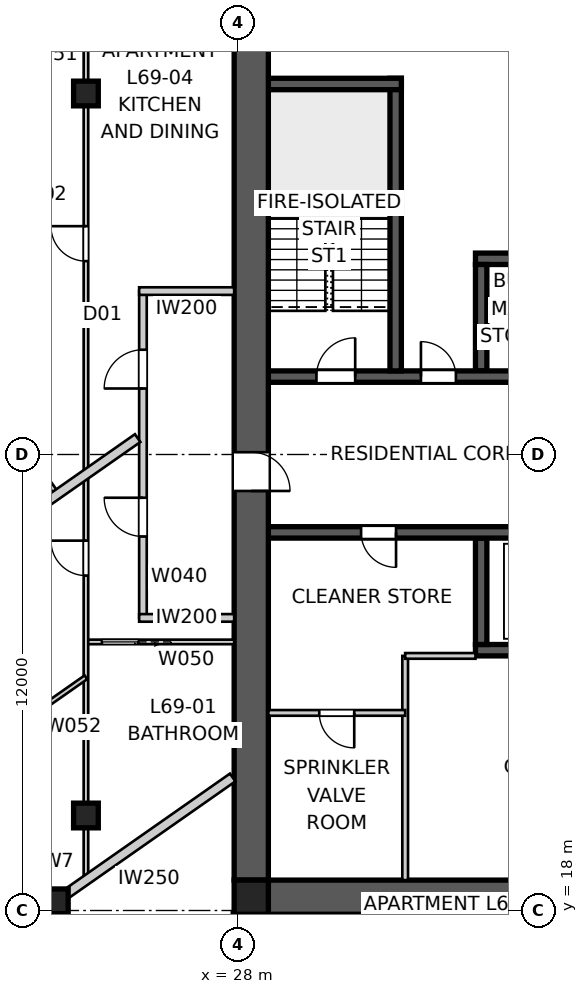
"""IFC4 building model, lengths in metres.
Left out: names, types, materials, properties, quantities, classifications, styles, units other than length and angle.
Written with IfcOpenShell. Run it as: python <this file> out.ifc"""

import sys

from ifc_helpers import new_model, si_unit, direction, frame, frame_2d, origin, origin_2d, place, context, subcontext, project, spatial, polyline, rectangle, outline, extrude, element, fill, save


model = new_model("IFC4")
c1 = context("Model", 3, precision=1e-05, world=origin(), true_north=direction((0.0, 1.0)))
c2 = subcontext(c1, "Body", "Model", "MODEL_VIEW")
j1 = project(units=[si_unit("LENGTHUNIT", "METRE"), si_unit("PLANEANGLEUNIT", "RADIAN")], contexts=[c1])
p1 = place(None, origin())
s1 = spatial("IfcSite", under=j1, at=p1, CompositionType="ELEMENT")
p2 = place(p1, origin())
s2 = spatial("IfcBuilding", under=s1, at=p2, CompositionType="ELEMENT")
p3 = place(p2, frame((0.0, 0.0, 250.6)))
s3 = spatial("IfcBuildingStorey", under=s2, at=p3, CompositionType="ELEMENT", Elevation=250.6)
p4 = place(p3, frame((51.2, 18.35, 0.0), z_axis=(0.0, 0.0, 1.0), x_axis=(-1.0, 0.0, 0.0)))
e1 = element("IfcWall", 1, at=p4, inside=s3, PredefinedType="SHEAR", context=c2, shape_type="SweptSolid", body=[
    extrude(outline(polyline([(0.0, -0.45), (22.4, -0.45), (22.4, -0.025), (22.85, -0.025), (22.85, 0.025), (22.4, 0.025), (22.4, 0.45), (0.0, 0.45), (0.0, 0.025), (-0.45, 0.025), (-0.45, -0.025), (0.0, -0.025), (0.0, -0.45)])), origin(), (0.0, 0.0, 1.0), 3.4),
])
p5 = place(p3, frame((28.35, 41.2, 0.0), z_axis=(0.0, 0.0, 1.0), x_axis=(0.0, -1.0, 0.0)))
e2 = element("IfcWall", 2, at=p5, inside=s3, PredefinedType="SHEAR", context=c2, shape_type="SweptSolid", body=[
    extrude(outline(polyline([(0.0, -0.45), (22.4, -0.45), (22.4, -0.025), (22.85, -0.025), (22.85, 0.025), (22.4, 0.025), (22.4, 0.45), (0.0, 0.45), (0.0, 0.025), (-0.45, 0.025), (-0.45, -0.025), (0.0, -0.025), (0.0, -0.45)])), origin(), (0.0, 0.0, 1.0), 3.4),
])
p6 = place(p5, frame((11.14, 0.0, 0.0)))
e3 = element("IfcOpeningElement", 3, at=p6, cuts=e2, PredefinedType="OPENING", context=c2, shape_type="SweptSolid", body=[
    extrude(rectangle(XDim=1.02, YDim=2.4, at=frame_2d((0.51, 1.2))), frame((0.0, 0.46, 0.0), z_axis=(0.0, -1.0, 0.0), x_axis=(1.0, 0.0, 0.0)), (0.0, 0.0, 1.0), 0.92),
])
p7 = place(p3, frame((28.8, 32.05, 0.0), z_axis=(0.0, 0.0, 1.0), x_axis=(1.0, 0.0, 0.0)))
e4 = element("IfcWall", 4, at=p7, inside=s3, PredefinedType="SHEAR", context=c2, shape_type="SweptSolid", body=[
    extrude(rectangle(XDim=22.4, YDim=0.3, at=frame_2d((11.2, 0.0))), origin(), (0.0, 0.0, 1.0), 3.4),
])
p8 = place(p7, frame((19.04, 0.0, 0.0)))
e5 = element("IfcOpeningElement", 5, at=p8, cuts=e4, PredefinedType="OPENING", context=c2, shape_type="SweptSolid", body=[
    extrude(rectangle(XDim=0.92, YDim=2.1, at=frame_2d((0.46, 1.05))), frame((0.0, 0.16, 0.0), z_axis=(0.0, -1.0, 0.0), x_axis=(1.0, 0.0, 0.0)), (0.0, 0.0, 1.0), 0.32),
])
p9 = place(p7, frame((1.265, 0.0, 0.0)))
e6 = element("IfcOpeningElement", 6, at=p9, cuts=e4, PredefinedType="OPENING", context=c2, shape_type="SweptSolid", body=[
    extrude(rectangle(XDim=1.02, YDim=2.1, at=frame_2d((0.51, 1.05))), frame((0.0, 0.16, 0.0), z_axis=(0.0, -1.0, 0.0), x_axis=(1.0, 0.0, 0.0)), (0.0, 0.0, 1.0), 0.32),
])
p10 = place(p7, frame((4.015, 0.0, 0.0)))
e7 = element("IfcOpeningElement", 7, at=p10, cuts=e4, PredefinedType="OPENING", context=c2, shape_type="SweptSolid", body=[
    extrude(rectangle(XDim=0.92, YDim=2.1, at=frame_2d((0.46, 1.05))), frame((0.0, 0.16, 0.0), z_axis=(0.0, -1.0, 0.0), x_axis=(1.0, 0.0, 0.0)), (0.0, 0.0, 1.0), 0.32),
])
p11 = place(p7, frame((6.565, 0.0, 0.0)))
e8 = element("IfcOpeningElement", 8, at=p11, cuts=e4, PredefinedType="OPENING", context=c2, shape_type="SweptSolid", body=[
    extrude(rectangle(XDim=0.92, YDim=2.1, at=frame_2d((0.46, 1.05))), frame((0.0, 0.16, 0.0), z_axis=(0.0, -1.0, 0.0), x_axis=(1.0, 0.0, 0.0)), (0.0, 0.0, 1.0), 0.32),
])
p12 = place(p7, frame((8.89, 0.0, 0.0)))
e9 = element("IfcOpeningElement", 9, at=p12, cuts=e4, PredefinedType="OPENING", context=c2, shape_type="SweptSolid", body=[
    extrude(rectangle(XDim=0.92, YDim=2.1, at=frame_2d((0.46, 1.05))), frame((0.0, 0.16, 0.0), z_axis=(0.0, -1.0, 0.0), x_axis=(1.0, 0.0, 0.0)), (0.0, 0.0, 1.0), 0.32),
])
p13 = place(p7, frame((12.05, 0.0, 0.0)))
e10 = element("IfcOpeningElement", 10, at=p13, cuts=e4, PredefinedType="OPENING", context=c2, shape_type="SweptSolid", body=[
    extrude(rectangle(XDim=1.1, YDim=2.1, at=frame_2d((0.55, 1.05))), frame((0.0, 0.16, 0.0), z_axis=(0.0, -1.0, 0.0), x_axis=(1.0, 0.0, 0.0)), (0.0, 0.0, 1.0), 0.32),
])
p14 = place(p7, frame((14.85, 0.0, 0.0)))
e11 = element("IfcOpeningElement", 11, at=p14, cuts=e4, PredefinedType="OPENING", context=c2, shape_type="SweptSolid", body=[
    extrude(rectangle(XDim=1.1, YDim=2.1, at=frame_2d((0.55, 1.05))), frame((0.0, 0.16, 0.0), z_axis=(0.0, -1.0, 0.0), x_axis=(1.0, 0.0, 0.0)), (0.0, 0.0, 1.0), 0.32),
])
p15 = place(p3, frame((51.2, 27.95, 0.0), z_axis=(0.0, 0.0, 1.0), x_axis=(-1.0, 0.0, 0.0)))
e12 = element("IfcWall", 12, at=p15, inside=s3, PredefinedType="SHEAR", context=c2, shape_type="SweptSolid", body=[
    extrude(rectangle(XDim=22.4, YDim=0.3, at=frame_2d((11.2, 0.0))), origin(), (0.0, 0.0, 1.0), 3.4),
])
p16 = place(p15, frame((19.04, 0.0, 0.0)))
e13 = element("IfcOpeningElement", 13, at=p16, cuts=e12, PredefinedType="OPENING", context=c2, shape_type="SweptSolid", body=[
    extrude(rectangle(XDim=0.92, YDim=2.1, at=frame_2d((0.46, 1.05))), frame((0.0, 0.16, 0.0), z_axis=(0.0, -1.0, 0.0), x_axis=(1.0, 0.0, 0.0)), (0.0, 0.0, 1.0), 0.32),
])
p17 = place(p15, frame((1.265, 0.0, 0.0)))
e14 = element("IfcOpeningElement", 14, at=p17, cuts=e12, PredefinedType="OPENING", context=c2, shape_type="SweptSolid", body=[
    extrude(rectangle(XDim=1.02, YDim=2.1, at=frame_2d((0.51, 1.05))), frame((0.0, 0.16, 0.0), z_axis=(0.0, -1.0, 0.0), x_axis=(1.0, 0.0, 0.0)), (0.0, 0.0, 1.0), 0.32),
])
p18 = place(p15, frame((4.015, 0.0, 0.0)))
e15 = element("IfcOpeningElement", 15, at=p18, cuts=e12, PredefinedType="OPENING", context=c2, shape_type="SweptSolid", body=[
    extrude(rectangle(XDim=0.92, YDim=2.1, at=frame_2d((0.46, 1.05))), frame((0.0, 0.16, 0.0), z_axis=(0.0, -1.0, 0.0), x_axis=(1.0, 0.0, 0.0)), (0.0, 0.0, 1.0), 0.32),
])
p19 = place(p15, frame((8.89, 0.0, 0.0)))
e16 = element("IfcOpeningElement", 16, at=p19, cuts=e12, PredefinedType="OPENING", context=c2, shape_type="SweptSolid", body=[
    extrude(rectangle(XDim=0.92, YDim=2.1, at=frame_2d((0.46, 1.05))), frame((0.0, 0.16, 0.0), z_axis=(0.0, -1.0, 0.0), x_axis=(1.0, 0.0, 0.0)), (0.0, 0.0, 1.0), 0.32),
])
p20 = place(p15, frame((6.565, 0.0, 0.0)))
e17 = element("IfcOpeningElement", 17, at=p20, cuts=e12, PredefinedType="OPENING", context=c2, shape_type="SweptSolid", body=[
    extrude(rectangle(XDim=0.92, YDim=2.1, at=frame_2d((0.46, 1.05))), frame((0.0, 0.16, 0.0), z_axis=(0.0, -1.0, 0.0), x_axis=(1.0, 0.0, 0.0)), (0.0, 0.0, 1.0), 0.32),
])
p21 = place(p15, frame((12.05, 0.0, 0.0)))
e18 = element("IfcOpeningElement", 18, at=p21, cuts=e12, PredefinedType="OPENING", context=c2, shape_type="SweptSolid", body=[
    extrude(rectangle(XDim=1.1, YDim=2.1, at=frame_2d((0.55, 1.05))), frame((0.0, 0.16, 0.0), z_axis=(0.0, -1.0, 0.0), x_axis=(1.0, 0.0, 0.0)), (0.0, 0.0, 1.0), 0.32),
])
p22 = place(p15, frame((14.85, 0.0, 0.0)))
e19 = element("IfcOpeningElement", 19, at=p22, cuts=e12, PredefinedType="OPENING", context=c2, shape_type="SweptSolid", body=[
    extrude(rectangle(XDim=1.1, YDim=2.1, at=frame_2d((0.55, 1.05))), frame((0.0, 0.16, 0.0), z_axis=(0.0, -1.0, 0.0), x_axis=(1.0, 0.0, 0.0)), (0.0, 0.0, 1.0), 0.32),
])
for number, where, z_axis, x_axis in (
    (20, (34.25, 35.15, 0.0), (0.0, 0.0, 1.0), (1.0, 0.0, 0.0)),
    (21, (45.75, 24.85, 0.0), (0.0, 0.0, 1.0), (-1.0, 0.0, 0.0)),
):
    element("IfcWall", number, at=place(p3, frame(where, z_axis=z_axis, x_axis=x_axis)), inside=s3, PredefinedType="SHEAR", context=c2, shape_type="SweptSolid", body=[
        extrude(rectangle(XDim=11.5, YDim=0.3, at=frame_2d((5.75, 0.0))), origin(), (0.0, 0.0, 1.0), 3.4),
    ])
for number, where, z_axis, x_axis in (
    (22, (34.4, 32.2, 0.0), (0.0, 0.0, 1.0), (0.0, 1.0, 0.0)),
    (23, (34.4, 27.8, 0.0), (0.0, 0.0, 1.0), (0.0, -1.0, 0.0)),
):
    element("IfcWall", number, at=place(p3, frame(where, z_axis=z_axis, x_axis=x_axis)), inside=s3, PredefinedType="SHEAR", context=c2, shape_type="SweptSolid", body=[
        extrude(rectangle(XDim=2.8, YDim=0.3, at=frame_2d((1.4, 0.0))), origin(), (0.0, 0.0, 1.0), 3.4),
    ])
p23 = place(p3, frame((32.15, 32.2, 0.0), z_axis=(0.0, 0.0, 1.0), x_axis=(0.0, 1.0, 0.0)))
e24 = element("IfcWall", 24, at=p23, inside=s3, PredefinedType="SHEAR", context=c2, shape_type="SweptSolid", body=[
    extrude(rectangle(XDim=7.7, YDim=0.3, at=frame_2d((3.85, 0.0))), origin(), (0.0, 0.0, 1.0), 3.4),
])
p24 = place(p3, frame((28.8, 39.75, 0.0), z_axis=(0.0, 0.0, 1.0), x_axis=(1.0, 0.0, 0.0)))
e25 = element("IfcWall", 25, at=p24, inside=s3, PredefinedType="SHEAR", context=c2, shape_type="SweptSolid", body=[
    extrude(rectangle(XDim=3.5, YDim=0.3, at=frame_2d((1.75, 0.0))), origin(), (0.0, 0.0, 1.0), 3.4),
])
p25 = place(p3, frame((28.35, 18.35, 0.0), z_axis=(0.0, 0.0, 1.0), x_axis=(1.0, 0.0, 0.0)))
e26 = element("IfcColumn", 26, at=p25, inside=s3, PredefinedType="COLUMN", context=c2, shape_type="SweptSolid", body=[
    extrude(rectangle(XDim=0.9, YDim=0.9, at=origin_2d()), origin(), (0.0, 0.0, 1.0), 3.4),
])
for number, where, z_axis, x_axis in (
    (27, (23.207, 18.242, 0.0), (0.0, 0.0, 1.0), (1.0, 0.0, 0.0)),
    (28, (24.0, 39.5, 0.0), (0.0, 0.0, 1.0), (1.0, 0.0, 0.0)),
    (29, (24.0, 20.5, 0.0), (0.0, 0.0, 1.0), (1.0, 0.0, 0.0)),
):
    element("IfcColumn", number, at=place(p3, frame(where, z_axis=z_axis, x_axis=x_axis)), inside=s3, PredefinedType="COLUMN", context=c2, shape_type="SweptSolid", body=[
        extrude(rectangle(XDim=0.65, YDim=0.65, at=origin_2d()), origin(), (0.0, 0.0, 1.0), 3.4),
    ])
p26 = place(p3, frame((25.5, 25.7, 0.0), z_axis=(0.0, 0.0, 1.0), x_axis=(0.0, 1.0, 0.0)))
e30 = element("IfcWall", 30, at=p26, inside=s3, PredefinedType="PARTITIONING", context=c2, shape_type="SweptSolid", body=[
    extrude(rectangle(XDim=8.6, YDim=0.2, at=frame_2d((4.3, 0.0))), origin(), (0.0, 0.0, 1.0), 3.25),
])
p27 = place(p26, frame((2.142, 0.0, 0.0)))
e31 = element("IfcOpeningElement", 31, at=p27, cuts=e30, PredefinedType="OPENING", context=c2, shape_type="SweptSolid", body=[
    extrude(rectangle(XDim=1.02, YDim=2.34, at=frame_2d((0.51, 1.17))), frame((0.0, 0.11, 0.0), z_axis=(0.0, -1.0, 0.0), x_axis=(1.0, 0.0, 0.0)), (0.0, 0.0, 1.0), 0.22),
])
p28 = place(p26, frame((6.037, 0.0, 0.0)))
e32 = element("IfcOpeningElement", 32, at=p28, cuts=e30, PredefinedType="OPENING", context=c2, shape_type="SweptSolid", body=[
    extrude(rectangle(XDim=1.02, YDim=2.34, at=frame_2d((0.51, 1.17))), frame((0.0, 0.11, 0.0), z_axis=(0.0, -1.0, 0.0), x_axis=(1.0, 0.0, 0.0)), (0.0, 0.0, 1.0), 0.22),
])
for number, where, z_axis, x_axis in (
    (33, (27.9, 34.3, 0.0), (0.0, 0.0, 1.0), (-1.0, 0.0, 0.0)),
    (34, (27.9, 25.7, 0.0), (0.0, 0.0, 1.0), (-1.0, 0.0, 0.0)),
):
    element("IfcWall", number, at=place(p3, frame(where, z_axis=z_axis, x_axis=x_axis)), inside=s3, PredefinedType="PARTITIONING", context=c2, shape_type="SweptSolid", body=[
        extrude(rectangle(XDim=2.5, YDim=0.2, at=frame_2d((1.25, 0.0))), origin(), (0.0, 0.0, 1.0), 3.25),
    ])
p29 = place(p3, frame((22.388, 17.668, 0.0), z_axis=(0.0, 0.0, 1.0), x_axis=(0.819161528122, 0.573562891796, 0.0)))
e35 = element("IfcWall", 35, at=p29, inside=s3, PredefinedType="PARTITIONING", context=c2, shape_type="SweptSolid", body=[
    extrude(rectangle(XDim=6.681, YDim=0.25, at=frame_2d((3.341, 0.0))), origin(), (0.0, 0.0, 1.0), 3.25),
])
p30 = place(p3, frame((17.369, 24.836, 0.0), z_axis=(0.0, 0.0, 1.0), x_axis=(0.81915902312, 0.573566469418, 0.0)))
e36 = element("IfcWall", 36, at=p30, inside=s3, PredefinedType="PARTITIONING", context=c2, shape_type="SweptSolid", body=[
    extrude(rectangle(XDim=9.756, YDim=0.25, at=frame_2d((4.878, 0.0))), origin(), (0.0, 0.0, 1.0), 3.25),
])
p31 = place(p3, frame((32.4, 18.8, 0.0), z_axis=(0.0, 0.0, 1.0), x_axis=(0.0, 1.0, 0.0)))
e37 = element("IfcWall", 37, at=p31, inside=s3, PredefinedType="SOLIDWALL", context=c2, shape_type="SweptSolid", body=[
    extrude(rectangle(XDim=5.9, YDim=0.15, at=frame_2d((2.95, 0.0))), origin(), (0.0, 0.0, 1.0), 3.25),
])
p32 = place(p3, frame((32.4, 24.7, 0.0), z_axis=(0.0, 0.0, 1.0), x_axis=(1.0, 0.0, 0.0)))
e38 = element("IfcWall", 38, at=p32, inside=s3, PredefinedType="SOLIDWALL", context=c2, shape_type="SweptSolid", body=[
    extrude(rectangle(XDim=1.85, YDim=0.15, at=frame_2d((0.925, 0.0))), origin(), (0.0, 0.0, 1.0), 3.25),
])
p33 = place(p3, frame((32.4, 23.2, 0.0), z_axis=(0.0, 0.0, 1.0), x_axis=(-1.0, 0.0, 0.0)))
e39 = element("IfcWall", 39, at=p33, inside=s3, PredefinedType="SOLIDWALL", context=c2, shape_type="SweptSolid", body=[
    extrude(rectangle(XDim=3.6, YDim=0.15, at=frame_2d((1.8, 0.0))), origin(), (0.0, 0.0, 1.0), 3.25),
])
p34 = place(p33, frame((1.34, 0.0, 0.0)))
e40 = element("IfcOpeningElement", 40, at=p34, cuts=e39, PredefinedType="OPENING", context=c2, shape_type="SweptSolid", body=[
    extrude(rectangle(XDim=0.92, YDim=2.1, at=frame_2d((0.46, 1.05))), frame((0.0, 0.085, 0.0), z_axis=(0.0, -1.0, 0.0), x_axis=(1.0, 0.0, 0.0)), (0.0, 0.0, 1.0), 0.17),
])
p35 = place(p3, frame((27.9, 25.068, 0.0), z_axis=(0.0, 0.0, 1.0), x_axis=(-1.0, 0.0, 0.0)))
e41 = element("IfcWall", 41, at=p35, inside=s3, PredefinedType="PARTITIONING", context=c2, shape_type="SweptSolid", body=[
    extrude(rectangle(XDim=3.9, YDim=0.12, at=frame_2d((1.95, 0.0))), origin(), (0.0, 0.0, 1.0), 3.25),
])
p36 = place(p35, frame((2.52, 0.0, 0.0)))
e42 = element("IfcOpeningElement", 42, at=p36, cuts=e41, PredefinedType="OPENING", context=c2, shape_type="SweptSolid", body=[
    extrude(rectangle(XDim=0.96, YDim=2.1, at=frame_2d((0.48, 1.05))), frame((0.0, 0.07, 0.0), z_axis=(0.0, -1.0, 0.0), x_axis=(1.0, 0.0, 0.0)), (0.0, 0.0, 1.0), 0.14),
])
p37 = place(p3, frame((24.0, 18.797, 0.0), z_axis=(0.0, 0.0, 1.0), x_axis=(0.0, 1.0, 0.0)))
e43 = element("IfcWall", 43, at=p37, inside=s3, PredefinedType="PARTITIONING", context=c2, shape_type="SweptSolid", body=[
    extrude(rectangle(XDim=26.198, YDim=0.12, at=frame_2d((13.099, 0.0))), origin(), (0.0, 0.0, 1.0), 2.55),
])
p38 = place(p37, frame((8.016, 0.0, 0.0)))
e44 = element("IfcOpeningElement", 44, at=p38, cuts=e43, PredefinedType="OPENING", context=c2, shape_type="SweptSolid", body=[
    extrude(rectangle(XDim=0.92, YDim=2.34, at=frame_2d((0.46, 1.17))), frame((0.0, 0.07, 0.0), z_axis=(0.0, -1.0, 0.0), x_axis=(1.0, 0.0, 0.0)), (0.0, 0.0, 1.0), 0.14),
])
p39 = place(p37, frame((16.292, 0.0, 0.0)))
e45 = element("IfcOpeningElement", 45, at=p39, cuts=e43, PredefinedType="OPENING", context=c2, shape_type="SweptSolid", body=[
    extrude(rectangle(XDim=0.92, YDim=2.34, at=frame_2d((0.46, 1.17))), frame((0.0, 0.07, 0.0), z_axis=(0.0, -1.0, 0.0), x_axis=(1.0, 0.0, 0.0)), (0.0, 0.0, 1.0), 0.14),
])
p40 = place(p3, frame((24.0, 24.138, 0.0), z_axis=(0.0, 0.0, 1.0), x_axis=(-0.819144584763, -0.57358708951, 0.0)))
e46 = element("IfcWall", 46, at=p40, inside=s3, PredefinedType="PARTITIONING", context=c2, shape_type="SweptSolid", body=[
    extrude(rectangle(XDim=4.991, YDim=0.12, at=frame_2d((2.496, 0.0))), origin(), (0.0, 0.0, 1.0), 3.25),
])
p41 = place(p40, frame((2.055, 0.0, 0.0)))
e47 = element("IfcOpeningElement", 47, at=p41, cuts=e46, PredefinedType="OPENING", context=c2, shape_type="SweptSolid", body=[
    extrude(rectangle(XDim=0.92, YDim=2.34, at=frame_2d((0.46, 1.17))), frame((0.0, 0.07, 0.0), z_axis=(0.0, -1.0, 0.0), x_axis=(1.0, 0.0, 0.0)), (0.0, 0.0, 1.0), 0.14),
])
p42 = place(p3, frame((27.9, 17.95, 0.0), z_axis=(0.0, 0.0, 1.0), x_axis=(0.0, -1.0, 0.0)))
e48 = element("IfcWall", 48, at=p42, inside=s3, PredefinedType="PARTITIONING", context=c2, shape_type="SweptSolid", body=[
    extrude(rectangle(XDim=0.909, YDim=0.12, at=frame_2d((0.454, 0.0))), origin(), (0.0, 0.0, 1.0), 3.25),
])
p43 = place(p3, frame((23.24, 28.947, 0.0), z_axis=(0.0, 0.0, 1.0), x_axis=(-0.573582185905, 0.819148018378, 0.0)))
e49 = element("IfcWall", 49, at=p43, inside=s3, PredefinedType="PARTITIONING", context=c2, shape_type="SweptSolid", body=[
    extrude(rectangle(XDim=8.75, YDim=0.12, at=frame_2d((4.375, 0.0))), origin(), (0.0, 0.0, 1.0), 3.25),
])
p44 = place(p43, frame((6.078, 0.0, 0.0)))
e50 = element("IfcOpeningElement", 50, at=p44, cuts=e49, PredefinedType="OPENING", context=c2, shape_type="SweptSolid", body=[
    extrude(rectangle(XDim=0.92, YDim=2.34, at=frame_2d((0.46, 1.17))), frame((0.0, 0.07, 0.0), z_axis=(0.0, -1.0, 0.0), x_axis=(1.0, 0.0, 0.0)), (0.0, 0.0, 1.0), 0.14),
])
p45 = place(p43, frame((1.752, 0.0, 0.0)))
e51 = element("IfcOpeningElement", 51, at=p45, cuts=e49, PredefinedType="OPENING", context=c2, shape_type="SweptSolid", body=[
    extrude(rectangle(XDim=0.92, YDim=2.34, at=frame_2d((0.46, 1.17))), frame((0.0, 0.07, 0.0), z_axis=(0.0, -1.0, 0.0), x_axis=(1.0, 0.0, 0.0)), (0.0, 0.0, 1.0), 0.14),
])
p46 = place(p16, origin())
e52 = element("IfcDoor", 52, at=p46, inside=s3, OperationType="SINGLE_SWING_LEFT", PredefinedType="DOOR", context=c2, shape_type="SweptSolid", body=[
    extrude(rectangle(XDim=0.92, YDim=2.1, at=frame_2d((0.46, 1.05))), frame((0.0, 0.025, 0.0), z_axis=(0.0, -1.0, 0.0), x_axis=(1.0, 0.0, 0.0)), (0.0, 0.0, 1.0), 0.05),
])
fill(e13, e52)
p47 = place(p9, origin())
e53 = element("IfcDoor", 53, at=p47, inside=s3, OperationType="SINGLE_SWING_RIGHT", PredefinedType="DOOR", context=c2, shape_type="SweptSolid", body=[
    extrude(rectangle(XDim=1.02, YDim=2.1, at=frame_2d((0.51, 1.05))), frame((0.0, 0.025, 0.0), z_axis=(0.0, -1.0, 0.0), x_axis=(1.0, 0.0, 0.0)), (0.0, 0.0, 1.0), 0.05),
])
fill(e6, e53)
p48 = place(p10, origin())
e54 = element("IfcDoor", 54, at=p48, inside=s3, OperationType="SINGLE_SWING_LEFT", PredefinedType="DOOR", context=c2, shape_type="SweptSolid", body=[
    extrude(rectangle(XDim=0.92, YDim=2.1, at=frame_2d((0.46, 1.05))), frame((0.0, 0.025, 0.0), z_axis=(0.0, -1.0, 0.0), x_axis=(1.0, 0.0, 0.0)), (0.0, 0.0, 1.0), 0.05),
])
fill(e7, e54)
p49 = place(p27, origin())
e55 = element("IfcDoor", 55, at=p49, inside=s3, OperationType="SINGLE_SWING_RIGHT", PredefinedType="DOOR", context=c2, shape_type="SweptSolid", body=[
    extrude(rectangle(XDim=1.02, YDim=2.34, at=frame_2d((0.51, 1.17))), frame((0.0, 0.025, 0.0), z_axis=(0.0, -1.0, 0.0), x_axis=(1.0, 0.0, 0.0)), (0.0, 0.0, 1.0), 0.05),
])
fill(e31, e55)
p50 = place(p28, origin())
e56 = element("IfcDoor", 56, at=p50, inside=s3, OperationType="SINGLE_SWING_LEFT", PredefinedType="DOOR", context=c2, shape_type="SweptSolid", body=[
    extrude(rectangle(XDim=1.02, YDim=2.34, at=frame_2d((0.51, 1.17))), frame((0.0, 0.025, 0.0), z_axis=(0.0, -1.0, 0.0), x_axis=(1.0, 0.0, 0.0)), (0.0, 0.0, 1.0), 0.05),
])
fill(e32, e56)
p51 = place(p34, origin())
e57 = element("IfcDoor", 57, at=p51, inside=s3, OperationType="SINGLE_SWING_LEFT", PredefinedType="DOOR", context=c2, shape_type="SweptSolid", body=[
    extrude(rectangle(XDim=0.92, YDim=2.1, at=frame_2d((0.46, 1.05))), frame((0.0, 0.025, 0.0), z_axis=(0.0, -1.0, 0.0), x_axis=(1.0, 0.0, 0.0)), (0.0, 0.0, 1.0), 0.05),
])
fill(e40, e57)
p52 = place(p38, origin())
e58 = element("IfcDoor", 58, at=p52, inside=s3, OperationType="SINGLE_SWING_RIGHT", PredefinedType="DOOR", context=c2, shape_type="SweptSolid", body=[
    extrude(rectangle(XDim=0.92, YDim=2.34, at=frame_2d((0.46, 1.17))), frame((0.0, 0.025, 0.0), z_axis=(0.0, -1.0, 0.0), x_axis=(1.0, 0.0, 0.0)), (0.0, 0.0, 1.0), 0.05),
])
fill(e44, e58)
p53 = place(p36, origin())
e59 = element("IfcDoor", 59, at=p53, inside=s3, OperationType="SLIDING_TO_LEFT", PredefinedType="DOOR", context=c2, shape_type="SweptSolid", body=[
    extrude(rectangle(XDim=0.96, YDim=2.1, at=frame_2d((0.48, 1.05))), frame((0.0, 0.025, 0.0), z_axis=(0.0, -1.0, 0.0), x_axis=(1.0, 0.0, 0.0)), (0.0, 0.0, 1.0), 0.05),
])
fill(e42, e59)
p54 = place(p39, origin())
e60 = element("IfcDoor", 60, at=p54, inside=s3, OperationType="SINGLE_SWING_RIGHT", PredefinedType="DOOR", context=c2, shape_type="SweptSolid", body=[
    extrude(rectangle(XDim=0.92, YDim=2.34, at=frame_2d((0.46, 1.17))), frame((0.0, 0.025, 0.0), z_axis=(0.0, -1.0, 0.0), x_axis=(1.0, 0.0, 0.0)), (0.0, 0.0, 1.0), 0.05),
])
fill(e45, e60)
p55 = place(p6, origin())
e61 = element("IfcDoor", 61, at=p55, inside=s3, OperationType="SINGLE_SWING_RIGHT", PredefinedType="DOOR", context=c2, shape_type="SweptSolid", body=[
    extrude(rectangle(XDim=1.02, YDim=2.4, at=frame_2d((0.51, 1.2))), frame((0.0, 0.025, 0.0), z_axis=(0.0, -1.0, 0.0), x_axis=(1.0, 0.0, 0.0)), (0.0, 0.0, 1.0), 0.05),
])
fill(e3, e61)
save(model, sys.argv[1])
